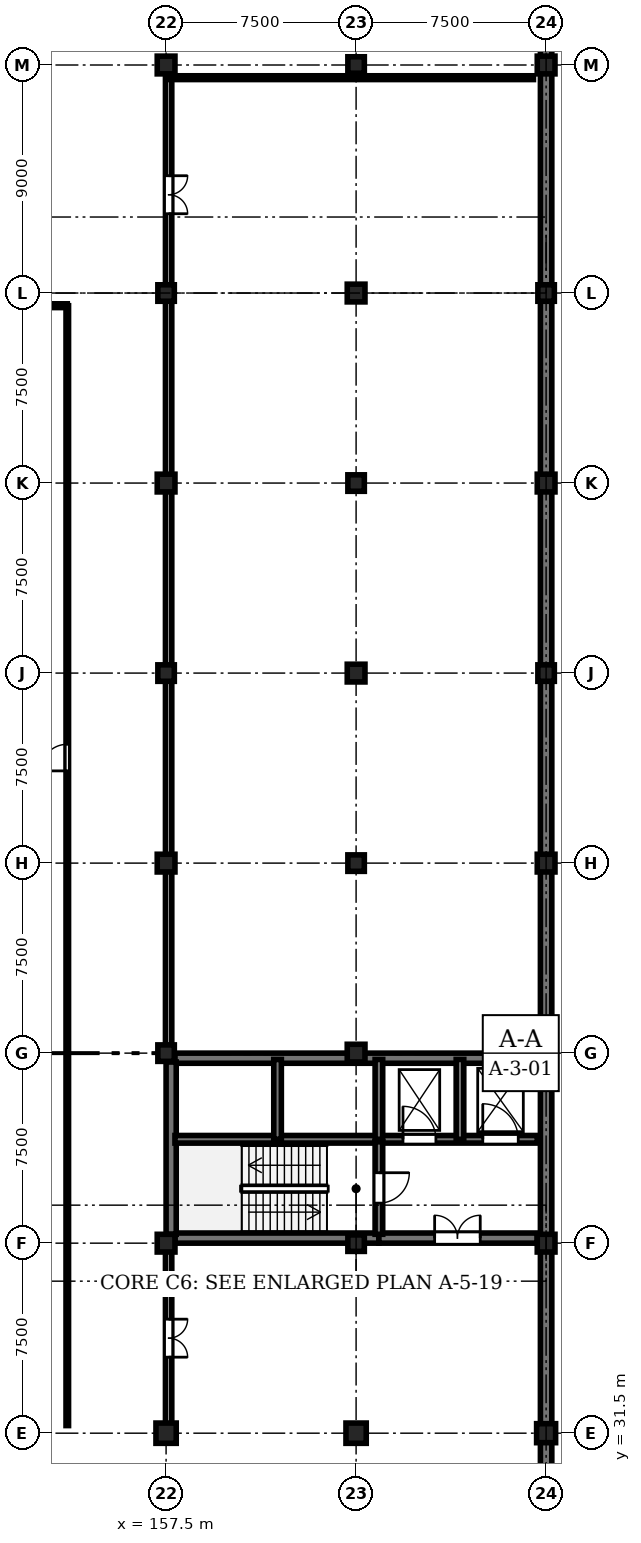
"""IFC4 building model, lengths in metres.
Left out: names, types, materials, properties, quantities, classifications, styles, units other than length and angle.
Written with IfcOpenShell. Run it as: python <this file> out.ifc"""

import sys

from ifc_helpers import new_model, si_unit, direction, frame, frame_2d, origin, origin_2d, place, context, subcontext, project, spatial, rectangle, circle, extrude, element, fill, save


model = new_model("IFC4")
c1 = context("Model", 3, precision=1e-05, world=origin(), true_north=direction((0.0, 1.0)))
c2 = subcontext(c1, "Body", "Model", "MODEL_VIEW")
j1 = project(units=[si_unit("LENGTHUNIT", "METRE"), si_unit("PLANEANGLEUNIT", "RADIAN")], contexts=[c1])
p1 = place(None, origin())
s1 = spatial("IfcSite", under=j1, at=p1, CompositionType="ELEMENT")
p2 = place(p1, origin())
s2 = spatial("IfcBuilding", under=s1, at=p2, CompositionType="ELEMENT")
p3 = place(p2, frame((0.0, 0.0, -4.5)))
s3 = spatial("IfcBuildingStorey", under=s2, at=p3, CompositionType="ELEMENT", Elevation=-4.5)
p4 = place(p3, frame((157.5, 31.5, 0.0), z_axis=(0.0, 0.0, 1.0), x_axis=(1.0, 0.0, 0.0)))
e1 = element("IfcColumn", 1, at=p4, inside=s3, PredefinedType="COLUMN", context=c2, shape_type="SweptSolid", body=[
    extrude(rectangle(XDim=0.8, YDim=0.8, at=origin_2d()), origin(), (0.0, 0.0, 1.0), 4.5),
])
p5 = place(p3, frame((157.5, 39.0, 0.0), z_axis=(0.0, 0.0, 1.0), x_axis=(1.0, 0.0, 0.0)))
e2 = element("IfcColumn", 2, at=p5, inside=s3, PredefinedType="COLUMN", context=c2, shape_type="SweptSolid", body=[
    extrude(rectangle(XDim=0.7, YDim=0.7, at=origin_2d()), origin(), (0.0, 0.0, 1.0), 4.5),
])
p6 = place(p3, frame((157.5, 46.5, 0.0), z_axis=(0.0, 0.0, 1.0), x_axis=(1.0, 0.0, 0.0)))
e3 = element("IfcColumn", 3, at=p6, inside=s3, PredefinedType="COLUMN", context=c2, shape_type="SweptSolid", body=[
    extrude(rectangle(XDim=0.65, YDim=0.65, at=origin_2d()), origin(), (0.0, 0.0, 1.0), 4.5),
])
p7 = place(p3, frame((157.5, 54.0, 0.0), z_axis=(0.0, 0.0, 1.0), x_axis=(1.0, 0.0, 0.0)))
e4 = element("IfcColumn", 4, at=p7, inside=s3, PredefinedType="COLUMN", context=c2, shape_type="SweptSolid", body=[
    extrude(rectangle(XDim=0.7, YDim=0.7, at=origin_2d()), origin(), (0.0, 0.0, 1.0), 4.5),
])
p8 = place(p3, frame((157.5, 61.5, 0.0), z_axis=(0.0, 0.0, 1.0), x_axis=(1.0, 0.0, 0.0)))
e5 = element("IfcColumn", 5, at=p8, inside=s3, PredefinedType="COLUMN", context=c2, shape_type="SweptSolid", body=[
    extrude(rectangle(XDim=0.65, YDim=0.65, at=origin_2d()), origin(), (0.0, 0.0, 1.0), 4.5),
])
p9 = place(p3, frame((157.5, 69.0, 0.0), z_axis=(0.0, 0.0, 1.0), x_axis=(1.0, 0.0, 0.0)))
e6 = element("IfcColumn", 6, at=p9, inside=s3, PredefinedType="COLUMN", context=c2, shape_type="SweptSolid", body=[
    extrude(rectangle(XDim=0.7, YDim=0.7, at=origin_2d()), origin(), (0.0, 0.0, 1.0), 4.5),
])
p10 = place(p3, frame((157.5, 76.5, 0.0), z_axis=(0.0, 0.0, 1.0), x_axis=(1.0, 0.0, 0.0)))
e7 = element("IfcColumn", 7, at=p10, inside=s3, PredefinedType="COLUMN", context=c2, shape_type="SweptSolid", body=[
    extrude(rectangle(XDim=0.65, YDim=0.65, at=origin_2d()), origin(), (0.0, 0.0, 1.0), 4.5),
])
p11 = place(p3, frame((157.5, 85.5, 0.0), z_axis=(0.0, 0.0, 1.0), x_axis=(1.0, 0.0, 0.0)))
e8 = element("IfcColumn", 8, at=p11, inside=s3, PredefinedType="COLUMN", context=c2, shape_type="SweptSolid", body=[
    extrude(rectangle(XDim=0.7, YDim=0.7, at=origin_2d()), origin(), (0.0, 0.0, 1.0), 4.5),
])
p12 = place(p3, frame((165.0, 31.5, 0.0), z_axis=(0.0, 0.0, 1.0), x_axis=(1.0, 0.0, 0.0)))
e9 = element("IfcColumn", 9, at=p12, inside=s3, PredefinedType="COLUMN", context=c2, shape_type="SweptSolid", body=[
    extrude(rectangle(XDim=0.8, YDim=0.8, at=origin_2d()), origin(), (0.0, 0.0, 1.0), 4.5),
])
p13 = place(p3, frame((165.0, 39.0, 0.0), z_axis=(0.0, 0.0, 1.0), x_axis=(1.0, 0.0, 0.0)))
e10 = element("IfcColumn", 10, at=p13, inside=s3, PredefinedType="COLUMN", context=c2, shape_type="SweptSolid", body=[
    extrude(rectangle(XDim=0.65, YDim=0.65, at=origin_2d()), origin(), (0.0, 0.0, 1.0), 4.5),
])
p14 = place(p3, frame((165.0, 46.5, 0.0), z_axis=(0.0, 0.0, 1.0), x_axis=(1.0, 0.0, 0.0)))
e11 = element("IfcColumn", 11, at=p14, inside=s3, PredefinedType="COLUMN", context=c2, shape_type="SweptSolid", body=[
    extrude(rectangle(XDim=0.7, YDim=0.7, at=origin_2d()), origin(), (0.0, 0.0, 1.0), 4.5),
])
p15 = place(p3, frame((165.0, 54.0, 0.0), z_axis=(0.0, 0.0, 1.0), x_axis=(1.0, 0.0, 0.0)))
e12 = element("IfcColumn", 12, at=p15, inside=s3, PredefinedType="COLUMN", context=c2, shape_type="SweptSolid", body=[
    extrude(rectangle(XDim=0.65, YDim=0.65, at=origin_2d()), origin(), (0.0, 0.0, 1.0), 4.5),
])
p16 = place(p3, frame((165.0, 61.5, 0.0), z_axis=(0.0, 0.0, 1.0), x_axis=(1.0, 0.0, 0.0)))
e13 = element("IfcColumn", 13, at=p16, inside=s3, PredefinedType="COLUMN", context=c2, shape_type="SweptSolid", body=[
    extrude(rectangle(XDim=0.7, YDim=0.7, at=origin_2d()), origin(), (0.0, 0.0, 1.0), 4.5),
])
p17 = place(p3, frame((165.0, 69.0, 0.0), z_axis=(0.0, 0.0, 1.0), x_axis=(1.0, 0.0, 0.0)))
e14 = element("IfcColumn", 14, at=p17, inside=s3, PredefinedType="COLUMN", context=c2, shape_type="SweptSolid", body=[
    extrude(rectangle(XDim=0.65, YDim=0.65, at=origin_2d()), origin(), (0.0, 0.0, 1.0), 4.5),
])
p18 = place(p3, frame((165.0, 76.5, 0.0), z_axis=(0.0, 0.0, 1.0), x_axis=(1.0, 0.0, 0.0)))
e15 = element("IfcColumn", 15, at=p18, inside=s3, PredefinedType="COLUMN", context=c2, shape_type="SweptSolid", body=[
    extrude(rectangle(XDim=0.7, YDim=0.7, at=origin_2d()), origin(), (0.0, 0.0, 1.0), 4.5),
])
p19 = place(p3, frame((165.0, 85.5, 0.0), z_axis=(0.0, 0.0, 1.0), x_axis=(1.0, 0.0, 0.0)))
e16 = element("IfcColumn", 16, at=p19, inside=s3, PredefinedType="COLUMN", context=c2, shape_type="SweptSolid", body=[
    extrude(rectangle(XDim=0.65, YDim=0.65, at=origin_2d()), origin(), (0.0, 0.0, 1.0), 4.5),
])
p20 = place(p3, frame((172.5, 31.5, 0.0), z_axis=(0.0, 0.0, 1.0), x_axis=(1.0, 0.0, 0.0)))
e17 = element("IfcColumn", 17, at=p20, inside=s3, PredefinedType="COLUMN", context=c2, shape_type="SweptSolid", body=[
    extrude(circle(Radius=0.375, at=origin_2d()), origin(), (0.0, 0.0, 1.0), 4.5),
])
p21 = place(p3, frame((172.5, 39.0, 0.0), z_axis=(0.0, 0.0, 1.0), x_axis=(1.0, 0.0, 0.0)))
e18 = element("IfcColumn", 18, at=p21, inside=s3, PredefinedType="COLUMN", context=c2, shape_type="SweptSolid", body=[
    extrude(rectangle(XDim=0.7, YDim=0.7, at=origin_2d()), origin(), (0.0, 0.0, 1.0), 4.5),
])
p22 = place(p3, frame((172.5, 46.5, 0.0), z_axis=(0.0, 0.0, 1.0), x_axis=(1.0, 0.0, 0.0)))
e19 = element("IfcColumn", 19, at=p22, inside=s3, PredefinedType="COLUMN", context=c2, shape_type="SweptSolid", body=[
    extrude(rectangle(XDim=0.65, YDim=0.65, at=origin_2d()), origin(), (0.0, 0.0, 1.0), 4.5),
])
p23 = place(p3, frame((172.5, 54.0, 0.0), z_axis=(0.0, 0.0, 1.0), x_axis=(1.0, 0.0, 0.0)))
e20 = element("IfcColumn", 20, at=p23, inside=s3, PredefinedType="COLUMN", context=c2, shape_type="SweptSolid", body=[
    extrude(rectangle(XDim=0.7, YDim=0.7, at=origin_2d()), origin(), (0.0, 0.0, 1.0), 4.5),
])
p24 = place(p3, frame((172.5, 61.5, 0.0), z_axis=(0.0, 0.0, 1.0), x_axis=(1.0, 0.0, 0.0)))
e21 = element("IfcColumn", 21, at=p24, inside=s3, PredefinedType="COLUMN", context=c2, shape_type="SweptSolid", body=[
    extrude(rectangle(XDim=0.65, YDim=0.65, at=origin_2d()), origin(), (0.0, 0.0, 1.0), 4.5),
])
p25 = place(p3, frame((172.5, 69.0, 0.0), z_axis=(0.0, 0.0, 1.0), x_axis=(1.0, 0.0, 0.0)))
e22 = element("IfcColumn", 22, at=p25, inside=s3, PredefinedType="COLUMN", context=c2, shape_type="SweptSolid", body=[
    extrude(rectangle(XDim=0.7, YDim=0.7, at=origin_2d()), origin(), (0.0, 0.0, 1.0), 4.5),
])
p26 = place(p3, frame((172.5, 76.5, 0.0), z_axis=(0.0, 0.0, 1.0), x_axis=(1.0, 0.0, 0.0)))
e23 = element("IfcColumn", 23, at=p26, inside=s3, PredefinedType="COLUMN", context=c2, shape_type="SweptSolid", body=[
    extrude(rectangle(XDim=0.65, YDim=0.65, at=origin_2d()), origin(), (0.0, 0.0, 1.0), 4.5),
])
p27 = place(p3, frame((172.5, 85.5, 0.0), z_axis=(0.0, 0.0, 1.0), x_axis=(1.0, 0.0, 0.0)))
e24 = element("IfcColumn", 24, at=p27, inside=s3, PredefinedType="COLUMN", context=c2, shape_type="SweptSolid", body=[
    extrude(rectangle(XDim=0.7, YDim=0.7, at=origin_2d()), origin(), (0.0, 0.0, 1.0), 4.5),
])
p28 = place(p3, frame((172.5, 93.0, 0.0), z_axis=(0.0, 0.0, 1.0), x_axis=(0.0, -1.0, 0.0)))
e25 = element("IfcWall", 25, at=p28, inside=s3, PredefinedType="SOLIDWALL", context=c2, shape_type="SweptSolid", body=[
    extrude(rectangle(XDim=7.5, YDim=0.45, at=frame_2d((3.75, 0.0))), origin(), (0.0, 0.0, 1.0), 4.14),
])
p29 = place(p3, frame((172.5, 85.5, 0.0), z_axis=(0.0, 0.0, 1.0), x_axis=(0.0, -1.0, 0.0)))
e26 = element("IfcWall", 26, at=p29, inside=s3, PredefinedType="SOLIDWALL", context=c2, shape_type="SweptSolid", body=[
    extrude(rectangle(XDim=9.0, YDim=0.45, at=frame_2d((4.5, 0.0))), origin(), (0.0, 0.0, 1.0), 4.14),
])
for number, where, z_axis, x_axis in (
    (27, (172.5, 76.5, 0.0), (0.0, 0.0, 1.0), (0.0, -1.0, 0.0)),
    (28, (172.5, 69.0, 0.0), (0.0, 0.0, 1.0), (0.0, -1.0, 0.0)),
    (29, (172.5, 61.5, 0.0), (0.0, 0.0, 1.0), (0.0, -1.0, 0.0)),
    (30, (172.5, 54.0, 0.0), (0.0, 0.0, 1.0), (0.0, -1.0, 0.0)),
    (31, (172.5, 46.5, 0.0), (0.0, 0.0, 1.0), (0.0, -1.0, 0.0)),
    (32, (172.5, 39.0, 0.0), (0.0, 0.0, 1.0), (0.0, -1.0, 0.0)),
):
    element("IfcWall", number, at=place(p3, frame(where, z_axis=z_axis, x_axis=x_axis)), inside=s3, PredefinedType="SOLIDWALL", context=c2, shape_type="SweptSolid", body=[
        extrude(rectangle(XDim=7.5, YDim=0.45, at=frame_2d((3.75, 0.0))), origin(), (0.0, 0.0, 1.0), 4.14),
    ])
p30 = place(p3, frame((172.5, 31.5, 0.0), z_axis=(0.0, 0.0, 1.0), x_axis=(0.0, -1.0, 0.0)))
e33 = element("IfcWall", 33, at=p30, inside=s3, PredefinedType="SOLIDWALL", context=c2, shape_type="SweptSolid", body=[
    extrude(rectangle(XDim=9.0, YDim=0.45, at=frame_2d((4.5, 0.0))), origin(), (0.0, 0.0, 1.0), 4.14),
])
p31 = place(p3, frame((157.85, 39.2, 0.0), z_axis=(0.0, 0.0, 1.0), x_axis=(1.0, 0.0, 0.0)))
e34 = element("IfcWall", 34, at=p31, inside=s3, PredefinedType="SHEAR", context=c2, shape_type="SweptSolid", body=[
    extrude(rectangle(XDim=8.05, YDim=0.4, at=frame_2d((4.025, 0.0))), origin(), (0.0, 0.0, 1.0), 4.14),
])
p32 = place(p3, frame((165.9, 39.2, 0.0), z_axis=(0.0, 0.0, 1.0), x_axis=(1.0, 0.0, 0.0)))
e35 = element("IfcWall", 35, at=p32, inside=s3, PredefinedType="SHEAR", context=c2, shape_type="SweptSolid", body=[
    extrude(rectangle(XDim=6.25, YDim=0.4, at=frame_2d((3.125, 0.0))), origin(), (0.0, 0.0, 1.0), 4.14),
])
p33 = place(p32, frame((2.2, 0.0, 0.0)))
e36 = element("IfcOpeningElement", 36, at=p33, cuts=e35, PredefinedType="OPENING", context=c2, shape_type="SweptSolid", body=[
    extrude(rectangle(XDim=1.8, YDim=2.25, at=frame_2d((0.9, 1.125))), frame((0.0, 0.21, 0.0), z_axis=(0.0, -1.0, 0.0), x_axis=(1.0, 0.0, 0.0)), (0.0, 0.0, 1.0), 0.42),
])
p34 = place(p3, frame((157.85, 46.3, 0.0), z_axis=(0.0, 0.0, 1.0), x_axis=(1.0, 0.0, 0.0)))
e37 = element("IfcWall", 37, at=p34, inside=s3, PredefinedType="SHEAR", context=c2, shape_type="SweptSolid", body=[
    extrude(rectangle(XDim=14.3, YDim=0.4, at=frame_2d((7.15, 0.0))), origin(), (0.0, 0.0, 1.0), 4.14),
])
p35 = place(p3, frame((157.7, 39.35, 0.0), z_axis=(0.0, 0.0, 1.0), x_axis=(0.0, 1.0, 0.0)))
e38 = element("IfcWall", 38, at=p35, inside=s3, PredefinedType="SHEAR", context=c2, shape_type="SweptSolid", body=[
    extrude(rectangle(XDim=6.8, YDim=0.4, at=frame_2d((3.4, 0.0))), origin(), (0.0, 0.0, 1.0), 4.14),
])
p36 = place(p3, frame((157.85, 43.1, 0.0), z_axis=(0.0, 0.0, 1.0), x_axis=(1.0, 0.0, 0.0)))
e39 = element("IfcWall", 39, at=p36, inside=s3, PredefinedType="SHEAR", context=c2, shape_type="SweptSolid", body=[
    extrude(rectangle(XDim=8.05, YDim=0.3, at=frame_2d((4.025, 0.0))), origin(), (0.0, 0.0, 1.0), 4.14),
])
p37 = place(p3, frame((165.9, 43.1, 0.0), z_axis=(0.0, 0.0, 1.0), x_axis=(1.0, 0.0, 0.0)))
e40 = element("IfcWall", 40, at=p37, inside=s3, PredefinedType="SHEAR", context=c2, shape_type="SweptSolid", body=[
    extrude(rectangle(XDim=6.25, YDim=0.3, at=frame_2d((3.125, 0.0))), origin(), (0.0, 0.0, 1.0), 4.14),
])
p38 = place(p37, frame((0.95, 0.0, 0.0)))
e41 = element("IfcOpeningElement", 41, at=p38, cuts=e40, PredefinedType="OPENING", context=c2, shape_type="SweptSolid", body=[
    extrude(rectangle(XDim=1.3, YDim=2.2, at=frame_2d((0.65, 1.1))), frame((0.0, 0.16, 0.0), z_axis=(0.0, -1.0, 0.0), x_axis=(1.0, 0.0, 0.0)), (0.0, 0.0, 1.0), 0.32),
])
p39 = place(p37, frame((4.1, 0.0, 0.0)))
e42 = element("IfcOpeningElement", 42, at=p39, cuts=e40, PredefinedType="OPENING", context=c2, shape_type="SweptSolid", body=[
    extrude(rectangle(XDim=1.4, YDim=2.25, at=frame_2d((0.7, 1.125))), frame((0.0, 0.16, 0.0), z_axis=(0.0, -1.0, 0.0), x_axis=(1.0, 0.0, 0.0)), (0.0, 0.0, 1.0), 0.32),
])
p40 = place(p3, frame((165.9, 43.0, 0.0), z_axis=(0.0, 0.0, 1.0), x_axis=(0.0, -1.0, 0.0)))
e43 = element("IfcWall", 43, at=p40, inside=s3, PredefinedType="SHEAR", context=c2, shape_type="SweptSolid", body=[
    extrude(rectangle(XDim=3.65, YDim=0.3, at=frame_2d((1.825, 0.0))), origin(), (0.0, 0.0, 1.0), 4.14),
])
p41 = place(p40, frame((1.22, 0.0, 0.0)))
e44 = element("IfcOpeningElement", 44, at=p41, cuts=e43, PredefinedType="OPENING", context=c2, shape_type="SweptSolid", body=[
    extrude(rectangle(XDim=1.2, YDim=2.25, at=frame_2d((0.6, 1.125))), frame((0.0, 0.16, 0.0), z_axis=(0.0, -1.0, 0.0), x_axis=(1.0, 0.0, 0.0)), (0.0, 0.0, 1.0), 0.32),
])
for number, where, z_axis, x_axis in (
    (45, (161.9, 43.1, 0.0), (0.0, 0.0, 1.0), (0.0, 1.0, 0.0)),
    (46, (165.9, 43.1, 0.0), (0.0, 0.0, 1.0), (0.0, 1.0, 0.0)),
    (47, (169.1, 43.1, 0.0), (0.0, 0.0, 1.0), (0.0, 1.0, 0.0)),
):
    element("IfcWall", number, at=place(p3, frame(where, z_axis=z_axis, x_axis=x_axis)), inside=s3, PredefinedType="SHEAR", context=c2, shape_type="SweptSolid", body=[
        extrude(rectangle(XDim=3.15, YDim=0.3, at=frame_2d((1.575, 0.0))), origin(), (0.0, 0.0, 1.0), 4.14),
    ])
p42 = place(p3, frame((153.6, 31.8, 0.0), z_axis=(0.0, 0.0, 1.0), x_axis=(0.0, 1.0, 0.0)))
e48 = element("IfcWall", 48, at=p42, inside=s3, PredefinedType="PARTITIONING", context=c2, shape_type="SweptSolid", body=[
    extrude(rectangle(XDim=44.2, YDim=0.1, at=frame_2d((22.1, 0.0))), origin(), (0.0, 0.0, 1.0), 3.725),
])
p43 = place(p42, frame((25.84, 0.0, 0.0)))
e49 = element("IfcOpeningElement", 49, at=p43, cuts=e48, PredefinedType="OPENING", context=c2, shape_type="SweptSolid", body=[
    extrude(rectangle(XDim=1.05, YDim=2.2, at=frame_2d((0.525, 1.1))), frame((0.0, 0.06, 0.0), z_axis=(0.0, -1.0, 0.0), x_axis=(1.0, 0.0, 0.0)), (0.0, 0.0, 1.0), 0.12),
])
p44 = place(p3, frame((157.6, 38.7, 0.0), z_axis=(0.0, 0.0, 1.0), x_axis=(0.0, -1.0, 0.0)))
e50 = element("IfcWall", 50, at=p44, inside=s3, PredefinedType="STANDARD", context=c2, shape_type="SweptSolid", body=[
    extrude(rectangle(XDim=6.9, YDim=0.25, at=frame_2d((3.45, 0.0))), origin(), (0.0, 0.0, 1.0), 3.525),
])
p45 = place(p44, frame((2.7, 0.0, 0.0)))
e51 = element("IfcOpeningElement", 51, at=p45, cuts=e50, PredefinedType="OPENING", context=c2, shape_type="SweptSolid", body=[
    extrude(rectangle(XDim=1.5, YDim=2.3, at=frame_2d((0.75, 1.15))), frame((0.0, 0.135, 0.0), z_axis=(0.0, -1.0, 0.0), x_axis=(1.0, 0.0, 0.0)), (0.0, 0.0, 1.0), 0.27),
])
p46 = place(p3, frame((157.6, 85.0, 0.0), z_axis=(0.0, 0.0, 1.0), x_axis=(0.0, -1.0, 0.0)))
e52 = element("IfcWall", 52, at=p46, inside=s3, PredefinedType="STANDARD", context=c2, shape_type="SweptSolid", body=[
    extrude(rectangle(XDim=38.2, YDim=0.25, at=frame_2d((19.1, 0.0))), origin(), (0.0, 0.0, 1.0), 3.425),
])
p47 = place(p46, frame((3.87, 0.0, 0.0)))
e53 = element("IfcOpeningElement", 53, at=p47, cuts=e52, PredefinedType="OPENING", context=c2, shape_type="SweptSolid", body=[
    extrude(rectangle(XDim=1.5, YDim=2.3, at=frame_2d((0.75, 1.15))), frame((0.0, 0.135, 0.0), z_axis=(0.0, -1.0, 0.0), x_axis=(1.0, 0.0, 0.0)), (0.0, 0.0, 1.0), 0.27),
])
p48 = place(p3, frame((143.0, 76.0, 0.0), z_axis=(0.0, 0.0, 1.0), x_axis=(1.0, 0.0, 0.0)))
e54 = element("IfcWall", 54, at=p48, inside=s3, PredefinedType="PARTITIONING", context=c2, shape_type="SweptSolid", body=[
    extrude(rectangle(XDim=10.6, YDim=0.15, at=frame_2d((5.3, 0.0))), origin(), (0.0, 0.0, 1.0), 4.125),
])
p49 = place(p3, frame((157.6, 85.0, 0.0), z_axis=(0.0, 0.0, 1.0), x_axis=(1.0, 0.0, 0.0)))
e55 = element("IfcWall", 55, at=p49, inside=s3, PredefinedType="PARTITIONING", context=c2, shape_type="SweptSolid", body=[
    extrude(rectangle(XDim=14.4, YDim=0.15, at=frame_2d((7.2, 0.0))), origin(), (0.0, 0.0, 1.0), 4.125),
])
p50 = place(p33, origin())
e56 = element("IfcDoor", 56, at=p50, inside=s3, OperationType="DOUBLE_DOOR_SINGLE_SWING", PredefinedType="DOOR", context=c2, shape_type="SweptSolid", body=[
    extrude(rectangle(XDim=1.8, YDim=2.25, at=frame_2d((0.9, 1.125))), frame((0.0, 0.025, 0.0), z_axis=(0.0, -1.0, 0.0), x_axis=(1.0, 0.0, 0.0)), (0.0, 0.0, 1.0), 0.05),
])
fill(e36, e56)
p51 = place(p38, origin())
e57 = element("IfcDoor", 57, at=p51, inside=s3, OperationType="DOUBLE_DOOR_SLIDING", PredefinedType="DOOR", context=c2, shape_type="SweptSolid", body=[
    extrude(rectangle(XDim=1.3, YDim=2.2, at=frame_2d((0.65, 1.1))), frame((0.0, 0.025, 0.0), z_axis=(0.0, -1.0, 0.0), x_axis=(1.0, 0.0, 0.0)), (0.0, 0.0, 1.0), 0.05),
])
fill(e41, e57)
p52 = place(p39, origin())
e58 = element("IfcDoor", 58, at=p52, inside=s3, OperationType="DOUBLE_DOOR_SLIDING", PredefinedType="DOOR", context=c2, shape_type="SweptSolid", body=[
    extrude(rectangle(XDim=1.4, YDim=2.25, at=frame_2d((0.7, 1.125))), frame((0.0, 0.025, 0.0), z_axis=(0.0, -1.0, 0.0), x_axis=(1.0, 0.0, 0.0)), (0.0, 0.0, 1.0), 0.05),
])
fill(e42, e58)
p53 = place(p41, origin())
e59 = element("IfcDoor", 59, at=p53, inside=s3, OperationType="SINGLE_SWING_LEFT", PredefinedType="DOOR", context=c2, shape_type="SweptSolid", body=[
    extrude(rectangle(XDim=1.2, YDim=2.25, at=frame_2d((0.6, 1.125))), frame((0.0, 0.025, 0.0), z_axis=(0.0, -1.0, 0.0), x_axis=(1.0, 0.0, 0.0)), (0.0, 0.0, 1.0), 0.05),
])
fill(e44, e59)
p54 = place(p43, origin())
e60 = element("IfcDoor", 60, at=p54, inside=s3, OperationType="SINGLE_SWING_LEFT", PredefinedType="DOOR", context=c2, shape_type="SweptSolid", body=[
    extrude(rectangle(XDim=1.05, YDim=2.2, at=frame_2d((0.525, 1.1))), frame((0.0, 0.025, 0.0), z_axis=(0.0, -1.0, 0.0), x_axis=(1.0, 0.0, 0.0)), (0.0, 0.0, 1.0), 0.05),
])
fill(e49, e60)
p55 = place(p45, origin())
e61 = element("IfcDoor", 61, at=p55, inside=s3, OperationType="DOUBLE_DOOR_SINGLE_SWING", PredefinedType="DOOR", context=c2, shape_type="SweptSolid", body=[
    extrude(rectangle(XDim=1.5, YDim=2.3, at=frame_2d((0.75, 1.15))), frame((0.0, 0.025, 0.0), z_axis=(0.0, -1.0, 0.0), x_axis=(1.0, 0.0, 0.0)), (0.0, 0.0, 1.0), 0.05),
])
fill(e51, e61)
p56 = place(p47, origin())
e62 = element("IfcDoor", 62, at=p56, inside=s3, OperationType="DOUBLE_DOOR_SINGLE_SWING", PredefinedType="DOOR", context=c2, shape_type="SweptSolid", body=[
    extrude(rectangle(XDim=1.5, YDim=2.3, at=frame_2d((0.75, 1.15))), frame((0.0, 0.025, 0.0), z_axis=(0.0, -1.0, 0.0), x_axis=(1.0, 0.0, 0.0)), (0.0, 0.0, 1.0), 0.05),
])
fill(e53, e62)
save(model, sys.argv[1])
